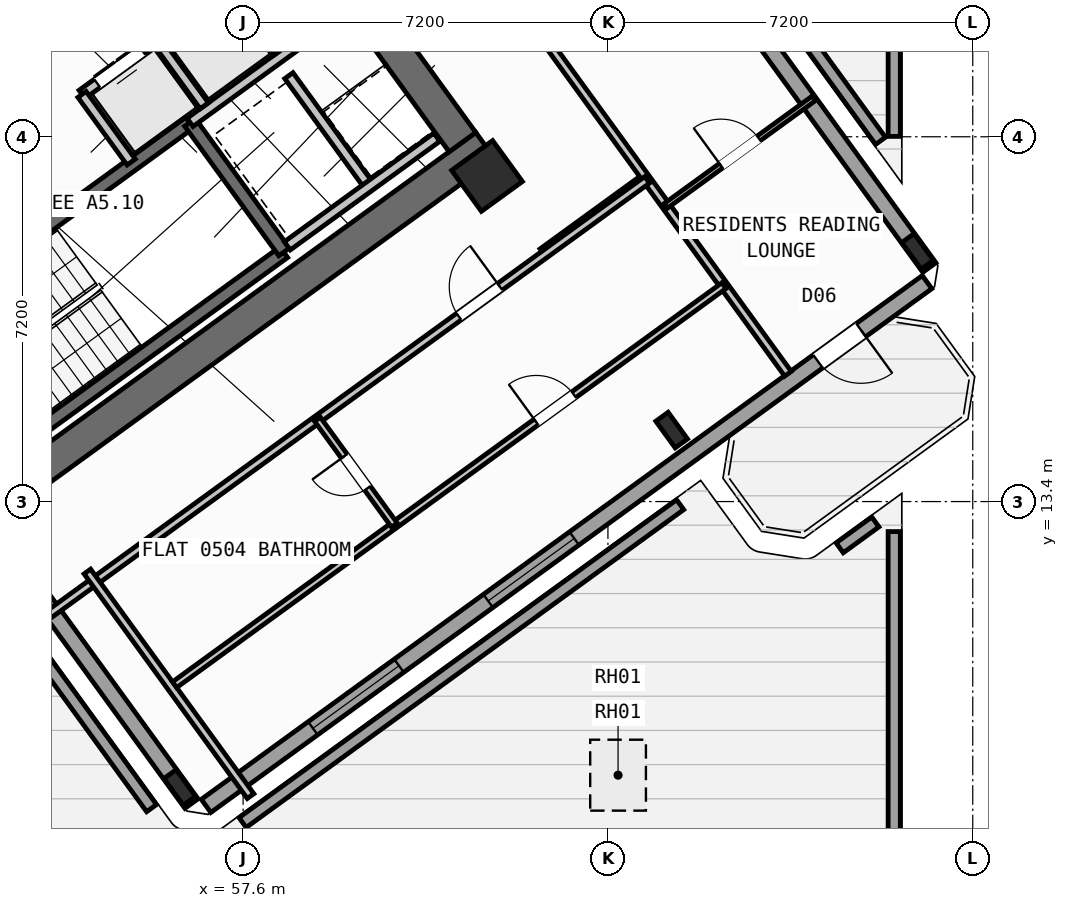
"""IFC4 building model, lengths in metres.
Left out: names, types, materials, properties, quantities, classifications, styles, units other than length and angle.
Written with IfcOpenShell. Run it as: python <this file> out.ifc"""

import sys

from ifc_helpers import new_model, si_unit, direction, frame, frame_2d, origin, origin_2d, place, context, subcontext, project, spatial, rectangle, hollow_rectangle, i_section, extrude, source, transform, mapped, element, fill, save


model = new_model("IFC4")
c1 = context("Model", 3, precision=1e-05, world=origin(), true_north=direction((0.0, 1.0)))
c2 = subcontext(c1, "Body", "Model", "MODEL_VIEW")
j1 = project(units=[si_unit("LENGTHUNIT", "METRE"), si_unit("PLANEANGLEUNIT", "RADIAN")], contexts=[c1])
p1 = place(None, origin())
s1 = spatial("IfcSite", under=j1, at=p1, CompositionType="ELEMENT")
p2 = place(p1, origin())
s2 = spatial("IfcBuilding", under=s1, at=p2, CompositionType="ELEMENT")
p3 = place(p2, frame((0.0, 0.0, 24.0)))
s3 = spatial("IfcBuildingStorey", under=s2, at=p3, CompositionType="ELEMENT", Elevation=24.0)
p4 = place(p3, frame((52.318, 13.11, 0.0), z_axis=(0.0, 0.0, 1.0), x_axis=(0.809019445368, 0.587781878776, 0.0)))
e1 = element("IfcWall", 1, at=p4, inside=s3, PredefinedType="SHEAR", context=c2, shape_type="SweptSolid", body=[
    extrude(rectangle(XDim=12.44, YDim=0.65, at=frame_2d((6.22, 0.0))), origin(), (0.0, 0.0, 1.0), 3.35),
])
p5 = place(p3, frame((61.929, 20.494, 0.0), z_axis=(0.0, 0.0, 1.0), x_axis=(-0.58782982593, 0.808984607855, 0.0)))
e2 = element("IfcWall", 2, at=p5, inside=s3, PredefinedType="SHEAR", context=c2, shape_type="SweptSolid", body=[
    extrude(rectangle(XDim=3.525, YDim=0.65, at=frame_2d((1.762, 0.0))), origin(), (0.0, 0.0, 1.0), 3.35),
])
m1 = source(origin(), c2, "Body", "SweptSolid", [
    extrude(i_section(OverallWidth=0.3, OverallDepth=0.65, WebThickness=0.016, FlangeThickness=0.031, at=origin_2d()), origin(), (0.0, 0.0, 1.0), 3.6),
])
for number, where, z_axis, x_axis in (
    (3, (56.35, 7.758, 0.0), (0.0, 0.0, 1.0), (0.809, 0.588, 0.0)),
    (4, (66.058, 14.811, 0.0), (0.0, 0.0, 1.0), (0.809, 0.588, 0.0)),
):
    element("IfcColumn", number, at=place(p3, frame(where, z_axis=z_axis, x_axis=x_axis)), inside=s3, PredefinedType="COLUMN", context=c2, shape_type="MappedRepresentation", body=[
        mapped(m1, transform((0.0, 0.0, 0.0), scale=1.0)),
    ])
m2 = source(origin(), c2, "Body", "SweptSolid", [
    extrude(hollow_rectangle(XDim=1.0, YDim=1.0, WallThickness=0.04, at=origin_2d()), origin(), (0.0, 0.0, 1.0), 3.6),
])
p6 = place(p3, frame((62.414, 19.827, 0.0), z_axis=(0.0, 0.0, 1.0), x_axis=(0.809016994375, 0.587785252292, 0.0)))
e5 = element("IfcColumn", 5, at=p6, inside=s3, PredefinedType="COLUMN", context=c2, shape_type="MappedRepresentation", body=[
    mapped(m2, transform((0.0, 0.0, 0.0), scale=1.0)),
])
p7 = place(p3, frame((70.912, 18.338, 0.0), z_axis=(0.0, 0.0, 1.0), x_axis=(0.809016994375, 0.587785252292, 0.0)))
e6 = element("IfcColumn", 6, at=p7, inside=s3, PredefinedType="COLUMN", context=c2, shape_type="MappedRepresentation", body=[
    mapped(m1, transform((0.0, 0.0, 0.0), scale=1.0)),
])
p8 = place(p3, frame((70.45, 42.678, 0.0), z_axis=(0.0, 0.0, 1.0), x_axis=(0.0, -1.0, 0.0)))
e7 = element("IfcWall", 7, at=p8, inside=s3, PredefinedType="PARAPET", context=c2, shape_type="SweptSolid", body=[
    extrude(rectangle(XDim=22.071, YDim=0.24, at=frame_2d((11.035, 0.0))), origin(), (0.0, 0.0, 1.0), 1.15),
])
p9 = place(p3, frame((70.18, 20.52, 0.0), z_axis=(0.0, 0.0, 1.0), x_axis=(-0.587784691012, 0.809017402169, 0.0)))
e8 = element("IfcWall", 8, at=p9, inside=s3, PredefinedType="PARAPET", context=c2, shape_type="SweptSolid", body=[
    extrude(rectangle(XDim=18.608, YDim=0.24, at=frame_2d((9.304, 0.0))), origin(), (0.0, 0.0, 1.0), 1.15),
])
p10 = place(p3, frame((53.2, 10.918, 0.0), z_axis=(0.0, 0.0, 1.0), x_axis=(0.58778337766, -0.809018356372, 0.0)))
e9 = element("IfcWall", 9, at=p10, inside=s3, PredefinedType="PARAPET", context=c2, shape_type="SweptSolid", body=[
    extrude(rectangle(XDim=4.412, YDim=0.24, at=frame_2d((2.206, 0.0))), origin(), (0.0, 0.0, 1.0), 1.15),
])
p11 = place(p3, frame((57.59, 7.064, 0.0), z_axis=(0.0, 0.0, 1.0), x_axis=(0.809025796011, 0.58777313769, 0.0)))
e10 = element("IfcWall", 10, at=p11, inside=s3, PredefinedType="PARAPET", context=c2, shape_type="SweptSolid", body=[
    extrude(rectangle(XDim=10.674, YDim=0.24, at=frame_2d((5.337, 0.0))), origin(), (0.0, 0.0, 1.0), 1.15),
])
p12 = place(p3, frame((69.374, 12.486, 0.0), z_axis=(0.0, 0.0, 1.0), x_axis=(0.808966568282, 0.587854651596, 0.0)))
e11 = element("IfcWall", 11, at=p12, inside=s3, PredefinedType="PARAPET", context=c2, shape_type="SweptSolid", body=[
    extrude(rectangle(XDim=0.87, YDim=0.24, at=frame_2d((0.435, 0.0))), origin(), (0.0, 0.0, 1.0), 1.15),
])
p13 = place(p3, frame((70.45, 12.808, 0.0), z_axis=(0.0, 0.0, 1.0), x_axis=(0.0, -1.0, 0.0)))
e12 = element("IfcWall", 12, at=p13, inside=s3, PredefinedType="PARAPET", context=c2, shape_type="SweptSolid", body=[
    extrude(rectangle(XDim=7.486, YDim=0.24, at=frame_2d((3.743, 0.0))), origin(), (0.0, 0.0, 1.0), 1.15),
])
p14 = place(p3, frame((58.455, 35.484, 0.0), z_axis=(0.0, 0.0, 1.0), x_axis=(0.587783625747, -0.809018176127, 0.0)))
e13 = element("IfcWall", 13, at=p14, inside=s3, PredefinedType="STANDARD", context=c2, shape_type="SweptSolid", body=[
    extrude(rectangle(XDim=21.587, YDim=0.32, at=frame_2d((10.794, 0.0))), origin(), (0.0, 0.0, 1.0), 2.725),
])
p15 = place(p14, frame((2.994, 0.0, 0.8)))
e14 = element("IfcOpeningElement", 14, at=p15, cuts=e13, PredefinedType="OPENING", context=c2, shape_type="SweptSolid", body=[
    extrude(rectangle(XDim=2.1, YDim=1.55, at=frame_2d((1.05, 0.775))), frame((0.0, 0.17, 0.0), z_axis=(0.0, -1.0, 0.0), x_axis=(1.0, 0.0, 0.0)), (0.0, 0.0, 1.0), 0.34),
])
p16 = place(p14, frame((11.934, 0.0, 0.85)))
e15 = element("IfcOpeningElement", 15, at=p16, cuts=e13, PredefinedType="OPENING", context=c2, shape_type="SweptSolid", body=[
    extrude(rectangle(XDim=1.8, YDim=1.5, at=frame_2d((0.9, 0.75))), frame((0.0, 0.17, 0.0), z_axis=(0.0, -1.0, 0.0), x_axis=(1.0, 0.0, 0.0)), (0.0, 0.0, 1.0), 0.34),
])
p17 = place(p3, frame((71.098, 17.731, 0.0), z_axis=(0.0, 0.0, 1.0), x_axis=(-0.809021120468, -0.587779573171, 0.0)))
e16 = element("IfcWall", 16, at=p17, inside=s3, PredefinedType="STANDARD", context=c2, shape_type="SweptSolid", body=[
    extrude(rectangle(XDim=17.588, YDim=0.32, at=frame_2d((8.794, 0.0))), origin(), (0.0, 0.0, 1.0), 3.35),
])
p18 = place(p17, frame((1.611, 0.0, 0.0)))
e17 = element("IfcOpeningElement", 17, at=p18, cuts=e16, PredefinedType="OPENING", context=c2, shape_type="SweptSolid", body=[
    extrude(rectangle(XDim=1.05, YDim=2.15, at=frame_2d((0.525, 1.075))), frame((0.0, 0.17, 0.0), z_axis=(0.0, -1.0, 0.0), x_axis=(1.0, 0.0, 0.0)), (0.0, 0.0, 1.0), 0.34),
])
p19 = place(p17, frame((8.606, 0.0, 0.8)))
e18 = element("IfcOpeningElement", 18, at=p19, cuts=e16, PredefinedType="OPENING", context=c2, shape_type="SweptSolid", body=[
    extrude(rectangle(XDim=2.1, YDim=1.55, at=frame_2d((1.05, 0.775))), frame((0.0, 0.17, 0.0), z_axis=(0.0, -1.0, 0.0), x_axis=(1.0, 0.0, 0.0)), (0.0, 0.0, 1.0), 0.34),
])
p20 = place(p17, frame((12.881, 0.0, 0.8)))
e19 = element("IfcOpeningElement", 19, at=p20, cuts=e16, PredefinedType="OPENING", context=c2, shape_type="SweptSolid", body=[
    extrude(rectangle(XDim=2.1, YDim=1.55, at=frame_2d((1.05, 0.775))), frame((0.0, 0.17, 0.0), z_axis=(0.0, -1.0, 0.0), x_axis=(1.0, 0.0, 0.0)), (0.0, 0.0, 1.0), 0.34),
])
p21 = place(p3, frame((56.581, 7.439, 0.0), z_axis=(0.0, 0.0, 1.0), x_axis=(-0.587785875463, 0.809016541614, 0.0)))
e20 = element("IfcWall", 20, at=p21, inside=s3, PredefinedType="STANDARD", context=c2, shape_type="SweptSolid", body=[
    extrude(rectangle(XDim=6.774, YDim=0.32, at=frame_2d((3.387, 0.0))), origin(), (0.0, 0.0, 1.0), 2.725),
])
p22 = place(p3, frame((52.472, 14.013, 0.0), z_axis=(0.0, 0.0, 1.0), x_axis=(0.809028366311, 0.587769599847, 0.0)))
e21 = element("IfcWall", 21, at=p22, inside=s3, PredefinedType="SHEAR", context=c2, shape_type="SweptSolid", body=[
    extrude(rectangle(XDim=7.33, YDim=0.26, at=frame_2d((3.665, 0.0))), origin(), (0.0, 0.0, 1.0), 3.35),
])
p23 = place(p3, frame((50.615, 16.57, 0.0), z_axis=(0.0, 0.0, 1.0), x_axis=(0.809028366311, 0.587769599847, 0.0)))
e22 = element("IfcWall", 22, at=p23, inside=s3, PredefinedType="SHEAR", context=c2, shape_type="SweptSolid", body=[
    extrude(rectangle(XDim=7.33, YDim=0.26, at=frame_2d((3.665, 0.0))), origin(), (0.0, 0.0, 1.0), 3.35),
])
p24 = place(p23, frame((0.22, 0.0, 0.0)))
e23 = element("IfcOpeningElement", 23, at=p24, cuts=e22, PredefinedType="OPENING", context=c2, shape_type="SweptSolid", body=[
    extrude(rectangle(XDim=1.1, YDim=2.1, at=frame_2d((0.55, 1.05))), frame((0.0, 0.14, 0.0), z_axis=(0.0, -1.0, 0.0), x_axis=(1.0, 0.0, 0.0)), (0.0, 0.0, 1.0), 0.28),
])
p25 = place(p3, frame((58.41, 18.327, 0.0), z_axis=(0.0, 0.0, 1.0), x_axis=(-0.58776738483, 0.809029975545, 0.0)))
e24 = element("IfcWall", 24, at=p25, inside=s3, PredefinedType="SHEAR", context=c2, shape_type="SweptSolid", body=[
    extrude(rectangle(XDim=3.16, YDim=0.26, at=frame_2d((1.58, 0.0))), origin(), (0.0, 0.0, 1.0), 3.35),
])
p26 = place(p3, frame((56.553, 20.884, 0.0), z_axis=(0.0, 0.0, 1.0), x_axis=(0.809035789462, 0.587759382205, 0.0)))
e25 = element("IfcWall", 25, at=p26, inside=s3, PredefinedType="STANDARD", context=c2, shape_type="SweptSolid", body=[
    extrude(rectangle(XDim=3.768, YDim=0.2, at=frame_2d((1.884, 0.0))), origin(), (0.0, 0.0, 1.0), 3.34),
])
p27 = place(p26, frame((2.65, 0.0, 0.0)))
e26 = element("IfcOpeningElement", 26, at=p27, cuts=e25, PredefinedType="OPENING", context=c2, shape_type="SweptSolid", body=[
    extrude(rectangle(XDim=0.86, YDim=2.05, at=frame_2d((0.43, 1.025))), frame((0.0, 0.11, 0.0), z_axis=(0.0, -1.0, 0.0), x_axis=(1.0, 0.0, 0.0)), (0.0, 0.0, 1.0), 0.22),
])
p28 = place(p3, frame((54.421, 21.436, 0.0), z_axis=(0.0, 0.0, 1.0), x_axis=(0.809013710463, 0.587789772183, 0.0)))
e27 = element("IfcWall", 27, at=p28, inside=s3, PredefinedType="STANDARD", context=c2, shape_type="SweptSolid", body=[
    extrude(rectangle(XDim=5.36, YDim=0.2, at=frame_2d((2.68, 0.0))), origin(), (0.0, 0.0, 1.0), 3.34),
])
p29 = place(p28, frame((0.37, 0.0, 0.0)))
e28 = element("IfcOpeningElement", 28, at=p29, cuts=e27, PredefinedType="OPENING", context=c2, shape_type="SweptSolid", body=[
    extrude(rectangle(XDim=1.1, YDim=2.15, at=frame_2d((0.55, 1.075))), frame((0.0, 0.11, 0.0), z_axis=(0.0, -1.0, 0.0), x_axis=(1.0, 0.0, 0.0)), (0.0, 0.0, 1.0), 0.22),
])
p30 = place(p28, frame((2.17, 0.0, 0.0)))
e29 = element("IfcOpeningElement", 29, at=p30, cuts=e27, PredefinedType="OPENING", context=c2, shape_type="SweptSolid", body=[
    extrude(rectangle(XDim=1.1, YDim=2.15, at=frame_2d((0.55, 1.075))), frame((0.0, 0.11, 0.0), z_axis=(0.0, -1.0, 0.0), x_axis=(1.0, 0.0, 0.0)), (0.0, 0.0, 1.0), 0.22),
])
p31 = place(p28, frame((3.97, 0.0, 0.0)))
e30 = element("IfcOpeningElement", 30, at=p31, cuts=e27, PredefinedType="OPENING", context=c2, shape_type="SweptSolid", body=[
    extrude(rectangle(XDim=1.1, YDim=2.15, at=frame_2d((0.55, 1.075))), frame((0.0, 0.11, 0.0), z_axis=(0.0, -1.0, 0.0), x_axis=(1.0, 0.0, 0.0)), (0.0, 0.0, 1.0), 0.22),
])
p32 = place(p3, frame((55.391, 20.102, 0.0), z_axis=(0.0, 0.0, 1.0), x_axis=(-0.58778447739, 0.809017557374, 0.0)))
e31 = element("IfcWall", 31, at=p32, inside=s3, PredefinedType="STANDARD", context=c2, shape_type="SweptSolid", body=[
    extrude(rectangle(XDim=1.65, YDim=0.2, at=frame_2d((0.825, 0.0))), origin(), (0.0, 0.0, 1.0), 3.34),
])
p33 = place(p3, frame((56.834, 21.212, 0.0), z_axis=(0.0, 0.0, 1.0), x_axis=(-0.58776738483, 0.809029975545, 0.0)))
e32 = element("IfcWall", 32, at=p33, inside=s3, PredefinedType="STANDARD", context=c2, shape_type="SweptSolid", body=[
    extrude(rectangle(XDim=1.58, YDim=0.2, at=frame_2d((0.79, 0.0))), origin(), (0.0, 0.0, 1.0), 3.34),
])
p34 = place(p3, frame((58.29, 22.27, 0.0), z_axis=(0.0, 0.0, 1.0), x_axis=(-0.587840865826, 0.808976585857, 0.0)))
e33 = element("IfcWall", 33, at=p34, inside=s3, PredefinedType="STANDARD", context=c2, shape_type="SweptSolid", body=[
    extrude(rectangle(XDim=1.58, YDim=0.2, at=frame_2d((0.79, 0.0))), origin(), (0.0, 0.0, 1.0), 3.34),
])
p35 = place(p3, frame((60.067, 19.655, 0.0), z_axis=(0.0, 0.0, 1.0), x_axis=(-0.587800520745, 0.809005900975, 0.0)))
e34 = element("IfcWall", 34, at=p35, inside=s3, PredefinedType="STANDARD", context=c2, shape_type="SweptSolid", body=[
    extrude(rectangle(XDim=2.66, YDim=0.2, at=frame_2d((1.33, 0.0))), origin(), (0.0, 0.0, 1.0), 3.34),
])
p36 = place(p3, frame((58.472, 18.447, 0.0), z_axis=(0.0, 0.0, 1.0), x_axis=(0.809022487728, 0.587777691266, 0.0)))
e35 = element("IfcWall", 35, at=p36, inside=s3, PredefinedType="STANDARD", context=c2, shape_type="SweptSolid", body=[
    extrude(rectangle(XDim=3.648, YDim=0.2, at=frame_2d((1.824, 0.0))), origin(), (0.0, 0.0, 1.0), 3.34),
])
p37 = place(p3, frame((63.507, 18.322, 0.0), z_axis=(0.0, 0.0, 1.0), x_axis=(0.809034604122, 0.587761013791, 0.0)))
e36 = element("IfcWall", 36, at=p37, inside=s3, PredefinedType="PARTITIONING", context=c2, shape_type="SweptSolid", body=[
    extrude(rectangle(XDim=2.51, YDim=0.16, at=frame_2d((1.255, 0.0))), origin(), (0.0, 0.0, 1.0), 3.34),
])
p38 = place(p3, frame((68.353, 15.922, 0.0), z_axis=(0.0, 0.0, 1.0), x_axis=(-0.587783168305, 0.809018508476, 0.0)))
e37 = element("IfcWall", 37, at=p38, inside=s3, PredefinedType="PARTITIONING", context=c2, shape_type="SweptSolid", body=[
    extrude(rectangle(XDim=10.65, YDim=0.16, at=frame_2d((5.325, 0.0))), origin(), (0.0, 0.0, 1.0), 3.34),
])
p39 = place(p3, frame((65.944, 19.238, 0.0), z_axis=(0.0, 0.0, 1.0), x_axis=(0.809013833588, 0.587789602718, 0.0)))
e38 = element("IfcWall", 38, at=p39, inside=s3, PredefinedType="PARTITIONING", context=c2, shape_type="SweptSolid", body=[
    extrude(rectangle(XDim=3.61, YDim=0.11, at=frame_2d((1.805, 0.0))), origin(), (0.0, 0.0, 1.0), 3.34),
])
p40 = place(p39, frame((1.345, 0.0, 0.0)))
e39 = element("IfcOpeningElement", 39, at=p40, cuts=e38, PredefinedType="OPENING", context=c2, shape_type="SweptSolid", body=[
    extrude(rectangle(XDim=0.92, YDim=2.08, at=frame_2d((0.46, 1.04))), frame((0.0, 0.065, 0.0), z_axis=(0.0, -1.0, 0.0), x_axis=(1.0, 0.0, 0.0)), (0.0, 0.0, 1.0), 0.13),
])
p41 = place(p3, frame((53.705, 11.126, 0.0), z_axis=(0.0, 0.0, 1.0), x_axis=(0.809014504436, 0.587788679384, 0.0)))
e40 = element("IfcWall", 40, at=p41, inside=s3, PredefinedType="PARTITIONING", context=c2, shape_type="SweptSolid", body=[
    extrude(rectangle(XDim=14.67, YDim=0.16, at=frame_2d((7.335, 0.0))), origin(), (0.0, 0.0, 1.0), 3.34),
])
p42 = place(p41, frame((10.08, 0.0, 0.0)))
e41 = element("IfcOpeningElement", 41, at=p42, cuts=e40, PredefinedType="OPENING", context=c2, shape_type="SweptSolid", body=[
    extrude(rectangle(XDim=1.0, YDim=2.1, at=frame_2d((0.5, 1.05))), frame((0.0, 0.09, 0.0), z_axis=(0.0, -1.0, 0.0), x_axis=(1.0, 0.0, 0.0)), (0.0, 0.0, 1.0), 0.18),
])
p43 = place(p3, frame((57.747, 7.586, 0.0), z_axis=(0.0, 0.0, 1.0), x_axis=(-0.587784893399, 0.809017255126, 0.0)))
e42 = element("IfcWall", 42, at=p43, inside=s3, PredefinedType="PARTITIONING", context=c2, shape_type="SweptSolid", body=[
    extrude(rectangle(XDim=5.48, YDim=0.16, at=frame_2d((2.74, 0.0))), origin(), (0.0, 0.0, 1.0), 3.34),
])
p44 = place(p3, frame((56.249, 9.785, 0.0), z_axis=(0.0, 0.0, 1.0), x_axis=(0.809011747655, 0.587792473715, 0.0)))
e43 = element("IfcWall", 43, at=p44, inside=s3, PredefinedType="PLUMBINGWALL", context=c2, shape_type="SweptSolid", body=[
    extrude(rectangle(XDim=13.4, YDim=0.14, at=frame_2d((6.7, 0.0))), origin(), (0.0, 0.0, 1.0), 3.34),
])
p45 = place(p44, frame((8.82, 0.0, 0.0)))
e44 = element("IfcOpeningElement", 44, at=p45, cuts=e43, PredefinedType="OPENING", context=c2, shape_type="SweptSolid", body=[
    extrude(rectangle(XDim=0.92, YDim=2.08, at=frame_2d((0.46, 1.04))), frame((0.0, 0.08, 0.0), z_axis=(0.0, -1.0, 0.0), x_axis=(1.0, 0.0, 0.0)), (0.0, 0.0, 1.0), 0.16),
])
p46 = place(p3, frame((60.585, 12.936, 0.0), z_axis=(0.0, 0.0, 1.0), x_axis=(-0.587772116736, 0.809026537752, 0.0)))
e45 = element("IfcWall", 45, at=p46, inside=s3, PredefinedType="PLUMBINGWALL", context=c2, shape_type="SweptSolid", body=[
    extrude(rectangle(XDim=2.58, YDim=0.14, at=frame_2d((1.29, 0.0))), origin(), (0.0, 0.0, 1.0), 3.34),
])
p47 = place(p46, frame((0.9, 0.0, 0.0)))
e46 = element("IfcOpeningElement", 46, at=p47, cuts=e45, PredefinedType="OPENING", context=c2, shape_type="SweptSolid", body=[
    extrude(rectangle(XDim=0.78, YDim=2.05, at=frame_2d((0.39, 1.025))), frame((0.0, 0.08, 0.0), z_axis=(0.0, -1.0, 0.0), x_axis=(1.0, 0.0, 0.0)), (0.0, 0.0, 1.0), 0.16),
])
p48 = place(p3, frame((0.0, 0.0, -0.26)))
p49 = place(p48, frame((65.0, 8.0, 0.0)))
p50 = place(p49, frame((0.0, 0.0, 0.26)))
e47 = element("IfcDoor", 47, at=p50, inside=s3, OperationType="SINGLE_SWING_LEFT", PredefinedType="TRAPDOOR", context=c2, shape_type="SweptSolid", body=[
    extrude(rectangle(XDim=1.1, YDim=1.4, at=origin_2d()), origin(), (0.0, 0.0, 1.0), 0.05),
])
m3 = source(origin(), c2, "Body", "SweptSolid", [
    extrude(rectangle(XDim=1.05, YDim=2.15, at=frame_2d((0.525, 1.075))), frame((0.0, 0.025, 0.0), z_axis=(0.0, -1.0, 0.0), x_axis=(1.0, 0.0, 0.0)), (0.0, 0.0, 1.0), 0.05),
])
p51 = place(p18, origin())
e48 = element("IfcDoor", 48, at=p51, inside=s3, OperationType="SINGLE_SWING_LEFT", PredefinedType="DOOR", context=c2, shape_type="MappedRepresentation", body=[
    mapped(m3, transform((0.0, 0.0, 0.0), scale=1.0)),
])
fill(e17, e48)
m4 = source(origin(), c2, "Body", "SweptSolid", [
    extrude(rectangle(XDim=2.1, YDim=1.55, at=frame_2d((1.05, 0.775))), frame((0.0, 0.03, 0.0), z_axis=(0.0, -1.0, 0.0), x_axis=(1.0, 0.0, 0.0)), (0.0, 0.0, 1.0), 0.06),
])
p52 = place(p19, origin())
e49 = element("IfcWindow", 49, at=p52, inside=s3, PartitioningType="SINGLE_PANEL", PredefinedType="WINDOW", context=c2, shape_type="MappedRepresentation", body=[
    mapped(m4, transform((0.0, 0.0, 0.0), scale=1.0)),
])
fill(e18, e49)
p53 = place(p20, origin())
e50 = element("IfcWindow", 50, at=p53, inside=s3, PartitioningType="SINGLE_PANEL", PredefinedType="WINDOW", context=c2, shape_type="MappedRepresentation", body=[
    mapped(m4, transform((0.0, 0.0, 0.0), scale=1.0)),
])
fill(e19, e50)
m5 = source(origin(), c2, "Body", "SweptSolid", [
    extrude(rectangle(XDim=1.1, YDim=2.15, at=frame_2d((0.55, 1.075))), frame((0.0, 0.025, 0.0), z_axis=(0.0, -1.0, 0.0), x_axis=(1.0, 0.0, 0.0)), (0.0, 0.0, 1.0), 0.05),
])
p54 = place(p29, origin())
e51 = element("IfcDoor", 51, at=p54, inside=s3, OperationType="DOUBLE_DOOR_SLIDING", PredefinedType="DOOR", context=c2, shape_type="MappedRepresentation", body=[
    mapped(m5, transform((0.0, 0.0, 0.0), scale=1.0)),
])
fill(e28, e51)
m6 = source(origin(), c2, "Body", "SweptSolid", [
    extrude(rectangle(XDim=0.92, YDim=2.08, at=frame_2d((0.46, 1.04))), frame((0.0, 0.025, 0.0), z_axis=(0.0, -1.0, 0.0), x_axis=(1.0, 0.0, 0.0)), (0.0, 0.0, 1.0), 0.05),
])
p55 = place(p40, origin())
e52 = element("IfcDoor", 52, at=p55, inside=s3, OperationType="SINGLE_SWING_LEFT", PredefinedType="DOOR", context=c2, shape_type="MappedRepresentation", body=[
    mapped(m6, transform((0.0, 0.0, 0.0), scale=1.0)),
])
fill(e39, e52)
m7 = source(origin(), c2, "Body", "SweptSolid", [
    extrude(rectangle(XDim=1.0, YDim=2.1, at=frame_2d((0.5, 1.05))), frame((0.0, 0.025, 0.0), z_axis=(0.0, -1.0, 0.0), x_axis=(1.0, 0.0, 0.0)), (0.0, 0.0, 1.0), 0.05),
])
p56 = place(p42, origin())
e53 = element("IfcDoor", 53, at=p56, inside=s3, OperationType="SINGLE_SWING_RIGHT", PredefinedType="DOOR", context=c2, shape_type="MappedRepresentation", body=[
    mapped(m7, transform((0.0, 0.0, 0.0), scale=1.0)),
])
fill(e41, e53)
p57 = place(p45, origin())
e54 = element("IfcDoor", 54, at=p57, inside=s3, OperationType="SINGLE_SWING_LEFT", PredefinedType="DOOR", context=c2, shape_type="MappedRepresentation", body=[
    mapped(m6, transform((0.0, 0.0, 0.0), scale=1.0)),
])
fill(e44, e54)
m8 = source(origin(), c2, "Body", "SweptSolid", [
    extrude(rectangle(XDim=0.78, YDim=2.05, at=frame_2d((0.39, 1.025))), frame((0.0, 0.025, 0.0), z_axis=(0.0, -1.0, 0.0), x_axis=(1.0, 0.0, 0.0)), (0.0, 0.0, 1.0), 0.05),
])
p58 = place(p47, origin())
e55 = element("IfcDoor", 55, at=p58, inside=s3, OperationType="SINGLE_SWING_RIGHT", PredefinedType="DOOR", context=c2, shape_type="MappedRepresentation", body=[
    mapped(m8, transform((0.0, 0.0, 0.0), scale=1.0)),
])
fill(e46, e55)
save(model, sys.argv[1])
